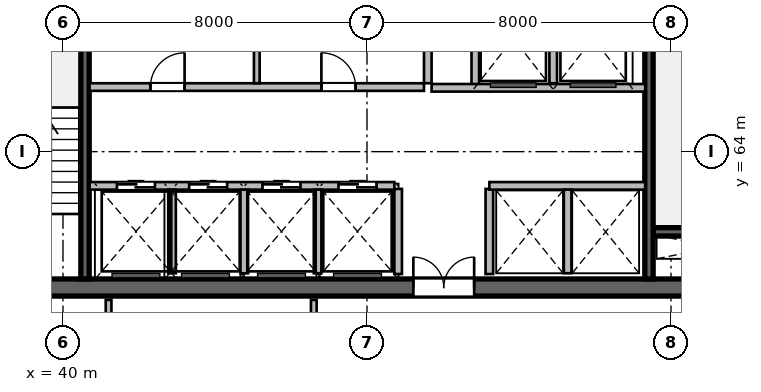
"""IFC4 building model, lengths in metres.
Left out: names, types, materials, properties, quantities, classifications, styles, units other than length and angle.
Written with IfcOpenShell. Run it as: python <this file> out.ifc"""

import sys

from ifc_helpers import new_model, si_unit, direction, frame, frame_2d, origin, place, context, subcontext, project, spatial, rectangle, extrude, source, transform, mapped, element, fill, save


model = new_model("IFC4")
c1 = context("Model", 3, precision=1e-05, world=origin(), true_north=direction((0.0, 1.0)))
c2 = subcontext(c1, "Body", "Model", "MODEL_VIEW")
j1 = project(units=[si_unit("LENGTHUNIT", "METRE"), si_unit("PLANEANGLEUNIT", "RADIAN")], contexts=[c1])
p1 = place(None, origin())
s1 = spatial("IfcSite", under=j1, at=p1, CompositionType="ELEMENT")
p2 = place(p1, origin())
s2 = spatial("IfcBuilding", under=s1, at=p2, CompositionType="ELEMENT")
p3 = place(p2, frame((0.0, 0.0, 250.8)))
s3 = spatial("IfcBuildingStorey", under=s2, at=p3, CompositionType="ELEMENT", Elevation=250.8)
m1 = source(origin(), c2, "Body", "SweptSolid", [
    extrude(rectangle(XDim=21.6, YDim=0.45, at=frame_2d((10.8, 0.0))), origin(), (0.0, 0.0, 1.0), 3.9),
])
p4 = place(p3, frame((37.2, 60.425, 0.0), z_axis=(0.0, 0.0, 1.0), x_axis=(1.0, 0.0, 0.0)))
e1 = element("IfcWall", 1, at=p4, inside=s3, PredefinedType="SHEAR", context=c2, shape_type="MappedRepresentation", body=[
    mapped(m1, transform((0.0, 0.0, 0.0), scale=1.0)),
])
p5 = place(p4, frame((1.1, 0.0, 0.0)))
e2 = element("IfcOpeningElement", 2, at=p5, cuts=e1, PredefinedType="OPENING", context=c2, shape_type="SweptSolid", body=[
    extrude(rectangle(XDim=1.15, YDim=2.15, at=frame_2d((0.575, 1.075))), frame((0.0, 0.235, 0.0), z_axis=(0.0, -1.0, 0.0), x_axis=(1.0, 0.0, 0.0)), (0.0, 0.0, 1.0), 0.47),
])
p6 = place(p4, frame((19.5, 0.0, 0.0)))
e3 = element("IfcOpeningElement", 3, at=p6, cuts=e1, PredefinedType="OPENING", context=c2, shape_type="SweptSolid", body=[
    extrude(rectangle(XDim=0.9, YDim=2.1, at=frame_2d((0.45, 1.05))), frame((0.0, 0.235, 0.0), z_axis=(0.0, -1.0, 0.0), x_axis=(1.0, 0.0, 0.0)), (0.0, 0.0, 1.0), 0.47),
])
p7 = place(p4, frame((12.02, 0.0, 0.0)))
e4 = element("IfcOpeningElement", 4, at=p7, cuts=e1, PredefinedType="OPENING", context=c2, shape_type="SweptSolid", body=[
    extrude(rectangle(XDim=1.6, YDim=2.15, at=frame_2d((0.8, 1.075))), frame((0.0, 0.235, 0.0), z_axis=(0.0, -1.0, 0.0), x_axis=(1.0, 0.0, 0.0)), (0.0, 0.0, 1.0), 0.47),
])
m2 = source(origin(), c2, "Body", "SweptSolid", [
    extrude(rectangle(XDim=3.27, YDim=0.22, at=frame_2d((1.635, 0.0))), origin(), (0.0, 0.0, 1.0), 3.9),
])
p8 = place(p3, frame((55.53, 61.89, 0.0), z_axis=(0.0, 0.0, 1.0), x_axis=(1.0, 0.0, 0.0)))
e5 = element("IfcWall", 5, at=p8, inside=s3, PredefinedType="SHEAR", context=c2, shape_type="MappedRepresentation", body=[
    mapped(m2, transform((0.0, 0.0, 0.0), scale=1.0)),
])
m3 = source(origin(), c2, "Body", "SweptSolid", [
    extrude(rectangle(XDim=11.1, YDim=0.22, at=frame_2d((5.55, 0.0))), origin(), (0.0, 0.0, 1.0), 3.9),
])
p9 = place(p3, frame((40.58, 60.65, 0.0), z_axis=(0.0, 0.0, 1.0), x_axis=(0.0, 1.0, 0.0)))
e6 = element("IfcWall", 6, at=p9, inside=s3, PredefinedType="SHEAR", context=c2, shape_type="MappedRepresentation", body=[
    mapped(m3, transform((0.0, 0.0, 0.0), scale=1.0)),
])
p10 = place(p3, frame((55.42, 60.65, 0.0), z_axis=(0.0, 0.0, 1.0), x_axis=(0.0, 1.0, 0.0)))
e7 = element("IfcWall", 7, at=p10, inside=s3, PredefinedType="SHEAR", context=c2, shape_type="MappedRepresentation", body=[
    mapped(m3, transform((0.0, 0.0, 0.0), scale=1.0)),
])
p11 = place(p10, frame((9.595, 0.0, 0.0)))
e8 = element("IfcOpeningElement", 8, at=p11, cuts=e7, PredefinedType="OPENING", context=c2, shape_type="SweptSolid", body=[
    extrude(rectangle(XDim=1.15, YDim=2.15, at=frame_2d((0.575, 1.075))), frame((0.0, 0.12, 0.0), z_axis=(0.0, -1.0, 0.0), x_axis=(1.0, 0.0, 0.0)), (0.0, 0.0, 1.0), 0.24),
])
m4 = source(origin(), c2, "Body", "SweptSolid", [
    extrude(rectangle(XDim=2.24, YDim=0.2, at=frame_2d((1.12, 0.0))), origin(), (0.0, 0.0, 1.0), 3.58),
])
for number, where, z_axis, x_axis in (
    (9, (48.82, 60.78, 0.0), (0.0, 0.0, 1.0), (0.0, 1.0, 0.0)),
    (10, (51.22, 60.78, 0.0), (0.0, 0.0, 1.0), (0.0, 1.0, 0.0)),
):
    element("IfcWall", number, at=place(p3, frame(where, z_axis=z_axis, x_axis=x_axis)), inside=s3, PredefinedType="SOLIDWALL", context=c2, shape_type="MappedRepresentation", body=[
        mapped(m4, transform((0.0, 0.0, 0.0), scale=1.0)),
    ])
m5 = source(origin(), c2, "Body", "SweptSolid", [
    extrude(rectangle(XDim=5.8, YDim=0.2, at=frame_2d((2.9, 0.0))), origin(), (0.0, 0.0, 1.0), 3.58),
])
p12 = place(p3, frame((49.6, 65.8, 0.0), z_axis=(0.0, 0.0, 1.0), x_axis=(0.0, 1.0, 0.0)))
e11 = element("IfcWall", 11, at=p12, inside=s3, PredefinedType="SOLIDWALL", context=c2, shape_type="MappedRepresentation", body=[
    mapped(m5, transform((0.0, 0.0, 0.0), scale=1.0)),
])
m6 = source(origin(), c2, "Body", "SweptSolid", [
    extrude(rectangle(XDim=2.58, YDim=0.2, at=frame_2d((1.29, 0.0))), origin(), (0.0, 0.0, 1.0), 3.58),
])
p13 = place(p3, frame((50.85, 65.68, 0.0), z_axis=(0.0, 0.0, 1.0), x_axis=(0.0, 1.0, 0.0)))
e12 = element("IfcWall", 12, at=p13, inside=s3, PredefinedType="SOLIDWALL", context=c2, shape_type="MappedRepresentation", body=[
    mapped(m6, transform((0.0, 0.0, 0.0), scale=1.0)),
])
m7 = source(origin(), c2, "Body", "SweptSolid", [
    extrude(rectangle(XDim=2.4, YDim=0.2, at=frame_2d((1.2, 0.0))), origin(), (0.0, 0.0, 1.0), 3.58),
])
p14 = place(p3, frame((52.9, 65.8, 0.0), z_axis=(0.0, 0.0, 1.0), x_axis=(0.0, 1.0, 0.0)))
e13 = element("IfcWall", 13, at=p14, inside=s3, PredefinedType="SOLIDWALL", context=c2, shape_type="MappedRepresentation", body=[
    mapped(m7, transform((0.0, 0.0, 0.0), scale=1.0)),
])
m8 = source(origin(), c2, "Body", "SweptSolid", [
    extrude(rectangle(XDim=5.62, YDim=0.2, at=frame_2d((2.81, 0.0))), origin(), (0.0, 0.0, 1.0), 3.58),
])
p15 = place(p3, frame((49.7, 65.68, 0.0), z_axis=(0.0, 0.0, 1.0), x_axis=(1.0, 0.0, 0.0)))
e14 = element("IfcWall", 14, at=p15, inside=s3, PredefinedType="SOLIDWALL", context=c2, shape_type="MappedRepresentation", body=[
    mapped(m8, transform((0.0, 0.0, 0.0), scale=1.0)),
])
m9 = source(origin(), c2, "Body", "SweptSolid", [
    extrude(rectangle(XDim=8.02, YDim=0.2, at=frame_2d((4.01, 0.0))), origin(), (0.0, 0.0, 1.0), 3.58),
])
p16 = place(p3, frame((40.7, 63.1, 0.0), z_axis=(0.0, 0.0, 1.0), x_axis=(1.0, 0.0, 0.0)))
e15 = element("IfcWall", 15, at=p16, inside=s3, PredefinedType="SOLIDWALL", context=c2, shape_type="MappedRepresentation", body=[
    mapped(m9, transform((0.0, 0.0, 0.0), scale=1.0)),
])
p17 = place(p16, frame((0.72, 0.0, 0.0)))
e16 = element("IfcOpeningElement", 16, at=p17, cuts=e15, PredefinedType="OPENING", context=c2, shape_type="SweptSolid", body=[
    extrude(rectangle(XDim=1.0, YDim=2.15, at=frame_2d((0.5, 1.075))), frame((0.0, 0.11, 0.0), z_axis=(0.0, -1.0, 0.0), x_axis=(1.0, 0.0, 0.0)), (0.0, 0.0, 1.0), 0.22),
])
p18 = place(p16, frame((2.62, 0.0, 0.0)))
e17 = element("IfcOpeningElement", 17, at=p18, cuts=e15, PredefinedType="OPENING", context=c2, shape_type="SweptSolid", body=[
    extrude(rectangle(XDim=1.0, YDim=2.15, at=frame_2d((0.5, 1.075))), frame((0.0, 0.11, 0.0), z_axis=(0.0, -1.0, 0.0), x_axis=(1.0, 0.0, 0.0)), (0.0, 0.0, 1.0), 0.22),
])
p19 = place(p16, frame((4.55, 0.0, 0.0)))
e18 = element("IfcOpeningElement", 18, at=p19, cuts=e15, PredefinedType="OPENING", context=c2, shape_type="SweptSolid", body=[
    extrude(rectangle(XDim=1.0, YDim=2.15, at=frame_2d((0.5, 1.075))), frame((0.0, 0.11, 0.0), z_axis=(0.0, -1.0, 0.0), x_axis=(1.0, 0.0, 0.0)), (0.0, 0.0, 1.0), 0.22),
])
p20 = place(p16, frame((6.55, 0.0, 0.0)))
e19 = element("IfcOpeningElement", 19, at=p20, cuts=e15, PredefinedType="OPENING", context=c2, shape_type="SweptSolid", body=[
    extrude(rectangle(XDim=1.0, YDim=2.15, at=frame_2d((0.5, 1.075))), frame((0.0, 0.11, 0.0), z_axis=(0.0, -1.0, 0.0), x_axis=(1.0, 0.0, 0.0)), (0.0, 0.0, 1.0), 0.22),
])
m10 = source(origin(), c2, "Body", "SweptSolid", [
    extrude(rectangle(XDim=4.1, YDim=0.2, at=frame_2d((2.05, 0.0))), origin(), (0.0, 0.0, 1.0), 3.58),
])
p21 = place(p3, frame((51.22, 63.1, 0.0), z_axis=(0.0, 0.0, 1.0), x_axis=(1.0, 0.0, 0.0)))
e20 = element("IfcWall", 20, at=p21, inside=s3, PredefinedType="SOLIDWALL", context=c2, shape_type="MappedRepresentation", body=[
    mapped(m10, transform((0.0, 0.0, 0.0), scale=1.0)),
])
m11 = source(origin(), c2, "Body", "SweptSolid", [
    extrude(rectangle(XDim=2.2, YDim=0.2, at=frame_2d((1.1, 0.0))), origin(), (0.0, 0.0, 1.0), 3.58),
])
for number, where, z_axis, x_axis in (
    (21, (42.87, 60.8, 0.0), (0.0, 0.0, 1.0), (0.0, 1.0, 0.0)),
    (22, (44.77, 60.8, 0.0), (0.0, 0.0, 1.0), (0.0, 1.0, 0.0)),
    (23, (46.7, 60.8, 0.0), (0.0, 0.0, 1.0), (0.0, 1.0, 0.0)),
    (24, (53.28, 60.8, 0.0), (0.0, 0.0, 1.0), (0.0, 1.0, 0.0)),
):
    element("IfcWall", number, at=place(p3, frame(where, z_axis=z_axis, x_axis=x_axis)), inside=s3, PredefinedType="SOLIDWALL", context=c2, shape_type="MappedRepresentation", body=[
        mapped(m11, transform((0.0, 0.0, 0.0), scale=1.0)),
    ])
m12 = source(origin(), c2, "Body", "SweptSolid", [
    extrude(rectangle(XDim=8.8, YDim=0.2, at=frame_2d((4.4, 0.0))), origin(), (0.0, 0.0, 1.0), 3.58),
])
p22 = place(p3, frame((40.7, 65.7, 0.0), z_axis=(0.0, 0.0, 1.0), x_axis=(1.0, 0.0, 0.0)))
e25 = element("IfcWall", 25, at=p22, inside=s3, PredefinedType="SOLIDWALL", context=c2, shape_type="MappedRepresentation", body=[
    mapped(m12, transform((0.0, 0.0, 0.0), scale=1.0)),
])
p23 = place(p22, frame((1.6, 0.0, 0.0)))
e26 = element("IfcOpeningElement", 26, at=p23, cuts=e25, PredefinedType="OPENING", context=c2, shape_type="SweptSolid", body=[
    extrude(rectangle(XDim=0.9, YDim=2.1, at=frame_2d((0.45, 1.05))), frame((0.0, 0.11, 0.0), z_axis=(0.0, -1.0, 0.0), x_axis=(1.0, 0.0, 0.0)), (0.0, 0.0, 1.0), 0.22),
])
p24 = place(p22, frame((6.1, 0.0, 0.0)))
e27 = element("IfcOpeningElement", 27, at=p24, cuts=e25, PredefinedType="OPENING", context=c2, shape_type="SweptSolid", body=[
    extrude(rectangle(XDim=0.9, YDim=2.1, at=frame_2d((0.45, 1.05))), frame((0.0, 0.11, 0.0), z_axis=(0.0, -1.0, 0.0), x_axis=(1.0, 0.0, 0.0)), (0.0, 0.0, 1.0), 0.22),
])
m13 = source(origin(), c2, "Body", "SweptSolid", [
    extrude(rectangle(XDim=2.4, YDim=0.15, at=frame_2d((1.2, 0.0))), origin(), (0.0, 0.0, 1.0), 3.58),
])
p25 = place(p3, frame((45.1, 65.8, 0.0), z_axis=(0.0, 0.0, 1.0), x_axis=(0.0, 1.0, 0.0)))
e28 = element("IfcWall", 28, at=p25, inside=s3, PredefinedType="PARTITIONING", context=c2, shape_type="MappedRepresentation", body=[
    mapped(m13, transform((0.0, 0.0, 0.0), scale=1.0)),
])
m14 = source(origin(), c2, "Body", "SweptSolid", [
    extrude(rectangle(XDim=2.033, YDim=0.15, at=frame_2d((1.016, 0.0))), origin(), (0.0, 0.0, 1.0), 3.58),
])
p26 = place(p3, frame((41.2, 58.067, 0.0), z_axis=(0.0, 0.0, 1.0), x_axis=(0.0, 1.0, 0.0)))
e29 = element("IfcWall", 29, at=p26, inside=s3, PredefinedType="PARTITIONING", context=c2, shape_type="MappedRepresentation", body=[
    mapped(m14, transform((0.0, 0.0, 0.0), scale=1.0)),
])
p27 = place(p26, frame((0.591, 0.0, 0.0)))
e30 = element("IfcOpeningElement", 30, at=p27, cuts=e29, PredefinedType="OPENING", context=c2, shape_type="SweptSolid", body=[
    extrude(rectangle(XDim=0.85, YDim=2.1, at=frame_2d((0.425, 1.05))), frame((0.0, 0.085, 0.0), z_axis=(0.0, -1.0, 0.0), x_axis=(1.0, 0.0, 0.0)), (0.0, 0.0, 1.0), 0.17),
])
p28 = place(p3, frame((46.6, 58.067, 0.0), z_axis=(0.0, 0.0, 1.0), x_axis=(0.0, 1.0, 0.0)))
e31 = element("IfcWall", 31, at=p28, inside=s3, PredefinedType="PARTITIONING", context=c2, shape_type="MappedRepresentation", body=[
    mapped(m14, transform((0.0, 0.0, 0.0), scale=1.0)),
])
m15 = source(origin(), c2, "Body", "SweptSolid", [
    extrude(rectangle(XDim=1.6, YDim=2.15, at=frame_2d((0.8, 1.075))), frame((0.0, 0.025, 0.0), z_axis=(0.0, -1.0, 0.0), x_axis=(1.0, 0.0, 0.0)), (0.0, 0.0, 1.0), 0.05),
])
p29 = place(p7, origin())
e32 = element("IfcDoor", 32, at=p29, inside=s3, OperationType="DOUBLE_DOOR_SINGLE_SWING", PredefinedType="DOOR", context=c2, shape_type="MappedRepresentation", body=[
    mapped(m15, transform((0.0, 0.0, 0.0), scale=1.0)),
])
fill(e4, e32)
m16 = source(origin(), c2, "Body", "SweptSolid", [
    extrude(rectangle(XDim=1.0, YDim=2.15, at=frame_2d((0.5, 1.075))), frame((0.0, 0.025, 0.0), z_axis=(0.0, -1.0, 0.0), x_axis=(1.0, 0.0, 0.0)), (0.0, 0.0, 1.0), 0.05),
])
p30 = place(p17, origin())
e33 = element("IfcDoor", 33, at=p30, inside=s3, OperationType="DOUBLE_DOOR_SLIDING", PredefinedType="DOOR", context=c2, shape_type="MappedRepresentation", body=[
    mapped(m16, transform((0.0, 0.0, 0.0), scale=1.0)),
])
fill(e16, e33)
p31 = place(p18, origin())
e34 = element("IfcDoor", 34, at=p31, inside=s3, OperationType="DOUBLE_DOOR_SLIDING", PredefinedType="DOOR", context=c2, shape_type="MappedRepresentation", body=[
    mapped(m16, transform((0.0, 0.0, 0.0), scale=1.0)),
])
fill(e17, e34)
p32 = place(p19, origin())
e35 = element("IfcDoor", 35, at=p32, inside=s3, OperationType="DOUBLE_DOOR_SLIDING", PredefinedType="DOOR", context=c2, shape_type="MappedRepresentation", body=[
    mapped(m16, transform((0.0, 0.0, 0.0), scale=1.0)),
])
fill(e18, e35)
p33 = place(p20, origin())
e36 = element("IfcDoor", 36, at=p33, inside=s3, OperationType="DOUBLE_DOOR_SLIDING", PredefinedType="DOOR", context=c2, shape_type="MappedRepresentation", body=[
    mapped(m16, transform((0.0, 0.0, 0.0), scale=1.0)),
])
fill(e19, e36)
m17 = source(origin(), c2, "Body", "SweptSolid", [
    extrude(rectangle(XDim=0.9, YDim=2.1, at=frame_2d((0.45, 1.05))), frame((0.0, 0.025, 0.0), z_axis=(0.0, -1.0, 0.0), x_axis=(1.0, 0.0, 0.0)), (0.0, 0.0, 1.0), 0.05),
])
p34 = place(p23, origin())
e37 = element("IfcDoor", 37, at=p34, inside=s3, OperationType="SINGLE_SWING_RIGHT", PredefinedType="DOOR", context=c2, shape_type="MappedRepresentation", body=[
    mapped(m17, transform((0.0, 0.0, 0.0), scale=1.0)),
])
fill(e26, e37)
p35 = place(p24, origin())
e38 = element("IfcDoor", 38, at=p35, inside=s3, OperationType="SINGLE_SWING_LEFT", PredefinedType="DOOR", context=c2, shape_type="MappedRepresentation", body=[
    mapped(m17, transform((0.0, 0.0, 0.0), scale=1.0)),
])
fill(e27, e38)
save(model, sys.argv[1])
